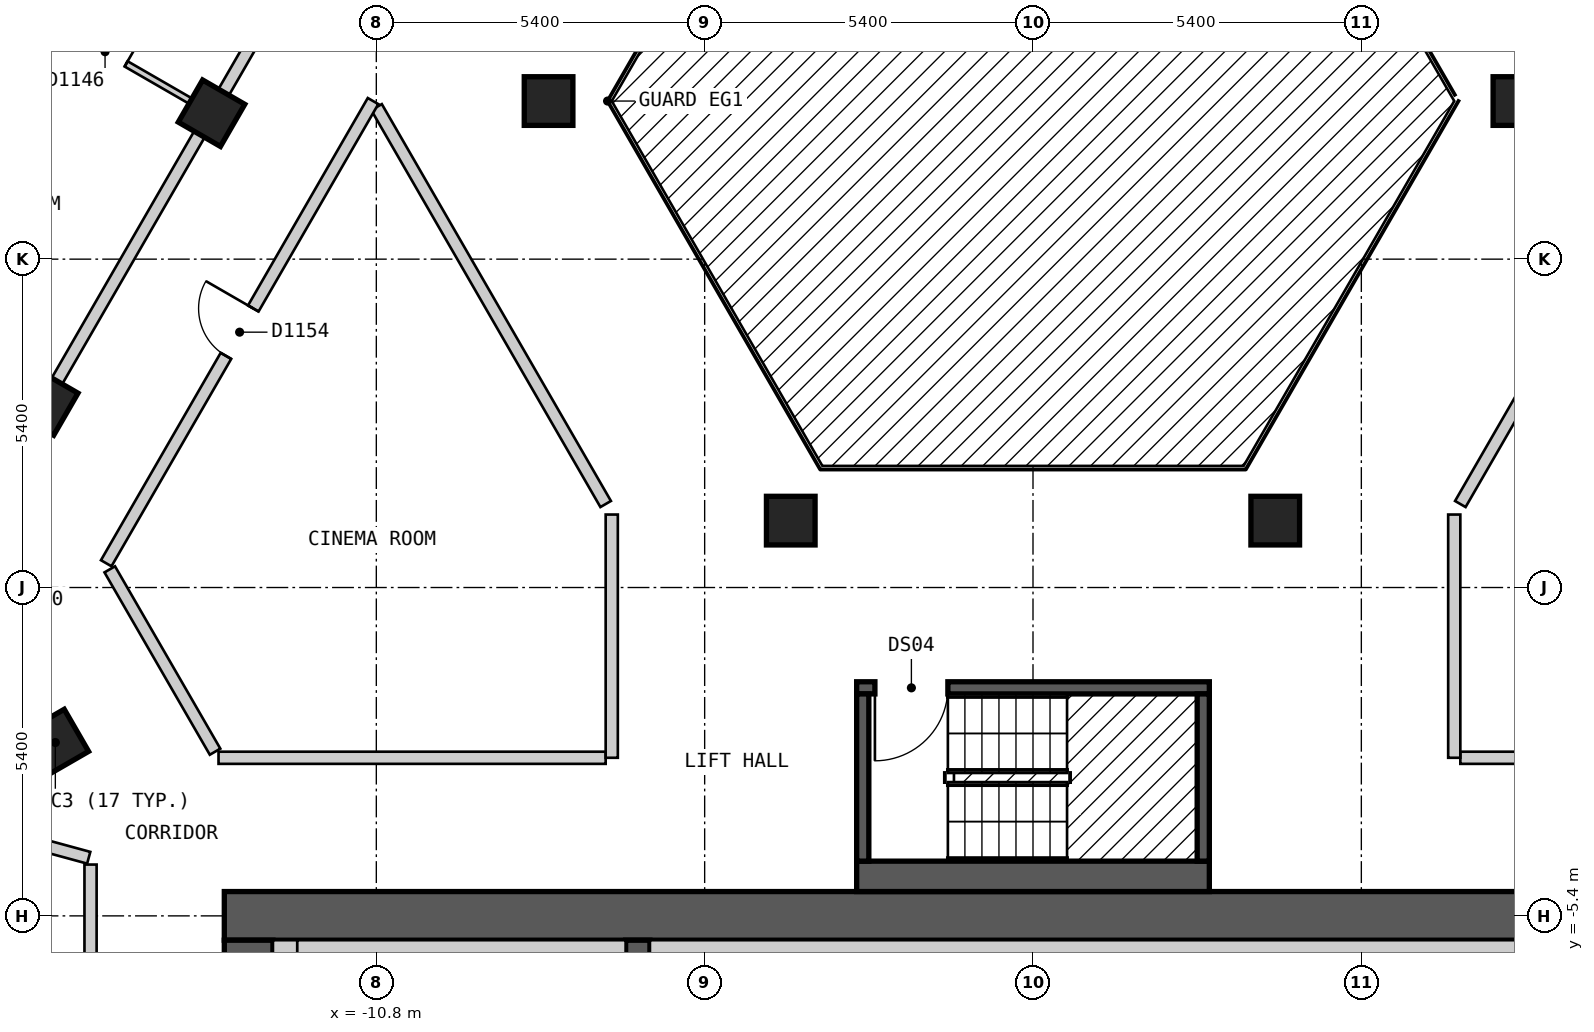
"""IFC4 building model, lengths in metres.
Left out: names, types, materials, properties, quantities, classifications, styles, units other than length and angle.
Written with IfcOpenShell. Run it as: python <this file> out.ifc"""

import sys

from ifc_helpers import new_model, si_unit, direction, frame, frame_2d, origin, origin_2d, place, context, subcontext, project, spatial, polyline, rectangle, outline, extrude, element, fill, save


model = new_model("IFC4")
c1 = context("Model", 3, precision=1e-05, world=origin(), true_north=direction((0.0, 1.0)))
c2 = subcontext(c1, "Body", "Model", "MODEL_VIEW")
j1 = project(units=[si_unit("LENGTHUNIT", "METRE"), si_unit("PLANEANGLEUNIT", "RADIAN")], contexts=[c1])
p1 = place(None, origin())
s1 = spatial("IfcSite", under=j1, at=p1, CompositionType="ELEMENT")
p2 = place(p1, origin())
s2 = spatial("IfcBuilding", under=s1, at=p2, CompositionType="ELEMENT")
p3 = place(p2, frame((0.0, 0.0, 144.6)))
s3 = spatial("IfcBuildingStorey", under=s2, at=p3, CompositionType="ELEMENT", Elevation=144.6)
for number, where, z_axis, x_axis in (
    (1, (-16.079, -2.549, 0.0), (0.0, 0.0, 1.0), (0.5, -0.866, 0.0)),
    (2, (3.984, 1.1, 0.0), (0.0, 0.0, 1.0), (1.0, 0.0, 0.0)),
    (3, (7.967, 8.0, 0.0), (0.0, 0.0, 1.0), (1.0, 0.0, 0.0)),
    (4, (-7.967, 8.0, 0.0), (0.0, 0.0, 1.0), (1.0, 0.0, 0.0)),
    (5, (-13.51, 7.8, 0.0), (0.0, 0.0, 1.0), (-0.5, -0.866, 0.0)),
    (6, (-3.984, 1.1, 0.0), (0.0, 0.0, 1.0), (1.0, 0.0, 0.0)),
    (7, (-16.253, 3.05, 0.0), (0.0, 0.0, 1.0), (-0.5, -0.866, 0.0)),
):
    element("IfcColumn", number, at=place(p3, frame(where, z_axis=z_axis, x_axis=x_axis)), inside=s3, PredefinedType="COLUMN", context=c2, shape_type="SweptSolid", body=[
        extrude(rectangle(XDim=0.8, YDim=0.8, at=origin_2d()), origin(), (0.0, 0.0, 1.0), 3.0),
    ])
p4 = place(p3, frame((-13.3, -5.4, 0.0), z_axis=(0.0, 0.0, 1.0), x_axis=(1.0, 0.0, 0.0)))
e8 = element("IfcWall", 8, at=p4, inside=s3, PredefinedType="SHEAR", context=c2, shape_type="SweptSolid", body=[
    extrude(rectangle(XDim=26.6, YDim=0.8, at=frame_2d((13.3, 0.0))), origin(), (0.0, 0.0, 1.0), 2.7),
])
p5 = place(p4, frame((23.65, 0.0, 0.0)))
e9 = element("IfcOpeningElement", 9, at=p5, cuts=e8, PredefinedType="OPENING", context=c2, shape_type="SweptSolid", body=[
    extrude(rectangle(XDim=1.2, YDim=2.1, at=frame_2d((0.6, 1.05))), frame((0.0, 0.41, 0.0), z_axis=(0.0, -1.0, 0.0), x_axis=(1.0, 0.0, 0.0)), (0.0, 0.0, 1.0), 0.82),
])
p6 = place(p3, frame((-12.9, -18.2, 0.0), z_axis=(0.0, 0.0, 1.0), x_axis=(0.0, 1.0, 0.0)))
e10 = element("IfcWall", 10, at=p6, inside=s3, PredefinedType="SHEAR", context=c2, shape_type="SweptSolid", body=[
    extrude(rectangle(XDim=12.4, YDim=0.8, at=frame_2d((6.2, 0.0))), origin(), (0.0, 0.0, 1.0), 2.7),
])
p7 = place(p6, frame((4.0, 0.0, 0.0)))
e11 = element("IfcOpeningElement", 11, at=p7, cuts=e10, PredefinedType="OPENING", context=c2, shape_type="SweptSolid", body=[
    extrude(rectangle(XDim=1.2, YDim=2.1, at=frame_2d((0.6, 1.05))), frame((0.0, 0.41, 0.0), z_axis=(0.0, -1.0, 0.0), x_axis=(1.0, 0.0, 0.0)), (0.0, 0.0, 1.0), 0.82),
])
p8 = place(p3, frame((-6.5, -9.15, 0.0), z_axis=(0.0, 0.0, 1.0), x_axis=(0.0, 1.0, 0.0)))
e12 = element("IfcWall", 12, at=p8, inside=s3, PredefinedType="SHEAR", context=c2, shape_type="SweptSolid", body=[
    extrude(rectangle(XDim=3.35, YDim=0.4, at=frame_2d((1.675, 0.0))), origin(), (0.0, 0.0, 1.0), 2.7),
])
p9 = place(p3, frame((-28.218, -2.025, 0.0), z_axis=(0.0, 0.0, 1.0), x_axis=(0.500017503135, -0.866015298109, 0.0)))
e13 = element("IfcWall", 13, at=p9, inside=s3, PredefinedType="SOLIDWALL", context=c2, shape_type="SweptSolid", body=[
    extrude(outline(polyline([(0.0, -0.15), (24.711, -0.15), (24.631, 0.15), (0.08, 0.15), (0.0, -0.15)])), origin(), (0.0, 0.0, 1.0), 2.7),
])
p10 = place(p9, frame((1.4, 0.0, 0.15)))
e14 = element("IfcOpeningElement", 14, at=p10, cuts=e13, PredefinedType="OPENING", context=c2, shape_type="SweptSolid", body=[
    extrude(rectangle(XDim=1.5, YDim=2.1, at=frame_2d((0.75, 1.05))), frame((0.0, 0.16, 0.0), z_axis=(0.0, -1.0, 0.0), x_axis=(1.0, 0.0, 0.0)), (0.0, 0.0, 1.0), 0.32),
])
p11 = place(p9, frame((4.316, 0.0, 0.15)))
e15 = element("IfcOpeningElement", 15, at=p11, cuts=e13, PredefinedType="OPENING", context=c2, shape_type="SweptSolid", body=[
    extrude(rectangle(XDim=1.5, YDim=2.1, at=frame_2d((0.75, 1.05))), frame((0.0, 0.16, 0.0), z_axis=(0.0, -1.0, 0.0), x_axis=(1.0, 0.0, 0.0)), (0.0, 0.0, 1.0), 0.32),
])
p12 = place(p9, frame((7.231, 0.0, 0.15)))
e16 = element("IfcOpeningElement", 16, at=p12, cuts=e13, PredefinedType="OPENING", context=c2, shape_type="SweptSolid", body=[
    extrude(rectangle(XDim=1.5, YDim=2.1, at=frame_2d((0.75, 1.05))), frame((0.0, 0.16, 0.0), z_axis=(0.0, -1.0, 0.0), x_axis=(1.0, 0.0, 0.0)), (0.0, 0.0, 1.0), 0.32),
])
p13 = place(p9, frame((10.147, 0.0, 0.15)))
e17 = element("IfcOpeningElement", 17, at=p13, cuts=e13, PredefinedType="OPENING", context=c2, shape_type="SweptSolid", body=[
    extrude(rectangle(XDim=1.5, YDim=2.1, at=frame_2d((0.75, 1.05))), frame((0.0, 0.16, 0.0), z_axis=(0.0, -1.0, 0.0), x_axis=(1.0, 0.0, 0.0)), (0.0, 0.0, 1.0), 0.32),
])
p14 = place(p9, frame((13.062, 0.0, 0.15)))
e18 = element("IfcOpeningElement", 18, at=p14, cuts=e13, PredefinedType="OPENING", context=c2, shape_type="SweptSolid", body=[
    extrude(rectangle(XDim=1.5, YDim=2.1, at=frame_2d((0.75, 1.05))), frame((0.0, 0.16, 0.0), z_axis=(0.0, -1.0, 0.0), x_axis=(1.0, 0.0, 0.0)), (0.0, 0.0, 1.0), 0.32),
])
p15 = place(p9, frame((15.977, 0.0, 0.15)))
e19 = element("IfcOpeningElement", 19, at=p15, cuts=e13, PredefinedType="OPENING", context=c2, shape_type="SweptSolid", body=[
    extrude(rectangle(XDim=1.5, YDim=2.1, at=frame_2d((0.75, 1.05))), frame((0.0, 0.16, 0.0), z_axis=(0.0, -1.0, 0.0), x_axis=(1.0, 0.0, 0.0)), (0.0, 0.0, 1.0), 0.32),
])
p16 = place(p9, frame((18.893, 0.0, 0.15)))
e20 = element("IfcOpeningElement", 20, at=p16, cuts=e13, PredefinedType="OPENING", context=c2, shape_type="SweptSolid", body=[
    extrude(rectangle(XDim=1.5, YDim=2.1, at=frame_2d((0.75, 1.05))), frame((0.0, 0.16, 0.0), z_axis=(0.0, -1.0, 0.0), x_axis=(1.0, 0.0, 0.0)), (0.0, 0.0, 1.0), 0.32),
])
p17 = place(p9, frame((21.809, 0.0, 0.15)))
e21 = element("IfcOpeningElement", 21, at=p17, cuts=e13, PredefinedType="OPENING", context=c2, shape_type="SweptSolid", body=[
    extrude(rectangle(XDim=1.5, YDim=2.1, at=frame_2d((0.75, 1.05))), frame((0.0, 0.16, 0.0), z_axis=(0.0, -1.0, 0.0), x_axis=(1.0, 0.0, 0.0)), (0.0, 0.0, 1.0), 0.32),
])
p18 = place(p3, frame((-2.9, -4.75, 0.0), z_axis=(0.0, 0.0, 1.0), x_axis=(1.0, 0.0, 0.0)))
e22 = element("IfcWall", 22, at=p18, inside=s3, PredefinedType="SOLIDWALL", context=c2, shape_type="SweptSolid", body=[
    extrude(rectangle(XDim=5.8, YDim=0.5, at=frame_2d((2.9, 0.0))), origin(), (0.0, 0.0, 1.0), 2.7),
])
p19 = place(p3, frame((-2.9, -1.65, 0.0), z_axis=(0.0, 0.0, 1.0), x_axis=(1.0, 0.0, 0.0)))
e23 = element("IfcWall", 23, at=p19, inside=s3, PredefinedType="SOLIDWALL", context=c2, shape_type="SweptSolid", body=[
    extrude(rectangle(XDim=5.8, YDim=0.2, at=frame_2d((2.9, 0.0))), origin(), (0.0, 0.0, 1.0), 2.7),
])
p20 = place(p19, frame((0.3, 0.0, 0.0)))
e24 = element("IfcOpeningElement", 24, at=p20, cuts=e23, PredefinedType="OPENING", context=c2, shape_type="SweptSolid", body=[
    extrude(rectangle(XDim=1.2, YDim=2.1, at=frame_2d((0.6, 1.05))), frame((0.0, 0.11, 0.0), z_axis=(0.0, -1.0, 0.0), x_axis=(1.0, 0.0, 0.0)), (0.0, 0.0, 1.0), 0.22),
])
for number, where, z_axis, x_axis in (
    (25, (-2.8, -4.5, 0.0), (0.0, 0.0, 1.0), (0.0, 1.0, 0.0)),
    (26, (2.8, -4.5, 0.0), (0.0, 0.0, 1.0), (0.0, 1.0, 0.0)),
):
    element("IfcWall", number, at=place(p3, frame(where, z_axis=z_axis, x_axis=x_axis)), inside=s3, PredefinedType="SOLIDWALL", context=c2, shape_type="SweptSolid", body=[
        extrude(rectangle(XDim=2.75, YDim=0.2, at=frame_2d((1.375, 0.0))), origin(), (0.0, 0.0, 1.0), 2.7),
    ])
p21 = place(p3, frame((-10.796, 7.9, 0.0), z_axis=(0.0, 0.0, 1.0), x_axis=(0.499954271211, -0.866051803703, 0.0)))
e27 = element("IfcWall", 27, at=p21, inside=s3, PredefinedType="PARTITIONING", context=c2, shape_type="SweptSolid", body=[
    extrude(rectangle(XDim=7.536, YDim=0.2, at=frame_2d((3.768, 0.0))), origin(), (0.0, 0.0, 1.0), 2.7),
])
p22 = place(p3, frame((-15.184, 0.299, 0.0), z_axis=(0.0, 0.0, 1.0), x_axis=(0.500149577091, -0.865939028186, 0.0)))
e28 = element("IfcWall", 28, at=p22, inside=s3, PredefinedType="PARTITIONING", context=c2, shape_type="SweptSolid", body=[
    extrude(rectangle(XDim=3.463, YDim=0.2, at=frame_2d((1.732, 0.0))), origin(), (0.0, 0.0, 1.0), 2.7),
])
p23 = place(p3, frame((-17.724, 0.299, 0.0), z_axis=(0.0, 0.0, 1.0), x_axis=(0.499910220442, -0.866077231832, 0.0)))
e29 = element("IfcWall", 29, at=p23, inside=s3, PredefinedType="PARTITIONING", context=c2, shape_type="SweptSolid", body=[
    extrude(rectangle(XDim=3.189, YDim=0.2, at=frame_2d((1.594, 0.0))), origin(), (0.0, 0.0, 1.0), 2.7),
])
p24 = place(p23, frame((0.183, 0.0, 0.0)))
e30 = element("IfcOpeningElement", 30, at=p24, cuts=e29, PredefinedType="OPENING", context=c2, shape_type="SweptSolid", body=[
    extrude(rectangle(XDim=0.8, YDim=2.1, at=frame_2d((0.4, 1.05))), frame((0.0, 0.11, 0.0), z_axis=(0.0, -1.0, 0.0), x_axis=(1.0, 0.0, 0.0)), (0.0, 0.0, 1.0), 0.22),
])
p25 = place(p3, frame((7.967, 13.0, 0.0), z_axis=(0.0, 0.0, 1.0), x_axis=(0.50003774998, -0.866003607726, 0.0)))
e31 = element("IfcWall", 31, at=p25, inside=s3, PredefinedType="PARTITIONING", context=c2, shape_type="SweptSolid", body=[
    extrude(rectangle(XDim=14.433, YDim=0.2, at=frame_2d((7.217, 0.0))), origin(), (0.0, 0.0, 1.0), 2.7),
])
p26 = place(p25, frame((6.824, 0.0, 0.0)))
e32 = element("IfcOpeningElement", 32, at=p26, cuts=e31, PredefinedType="OPENING", context=c2, shape_type="SweptSolid", body=[
    extrude(rectangle(XDim=0.9, YDim=2.1, at=frame_2d((0.45, 1.05))), frame((0.0, 0.11, 0.0), z_axis=(0.0, -1.0, 0.0), x_axis=(1.0, 0.0, 0.0)), (0.0, 0.0, 1.0), 0.22),
])
p27 = place(p3, frame((-13.395, -2.8, 0.0), z_axis=(0.0, 0.0, 1.0), x_axis=(1.0, 0.0, 0.0)))
e33 = element("IfcWall", 33, at=p27, inside=s3, PredefinedType="PARTITIONING", context=c2, shape_type="SweptSolid", body=[
    extrude(rectangle(XDim=6.367, YDim=0.2, at=frame_2d((3.184, 0.0))), origin(), (0.0, 0.0, 1.0), 2.7),
])
p28 = place(p3, frame((7.028, -2.8, 0.0), z_axis=(0.0, 0.0, 1.0), x_axis=(1.0, 0.0, 0.0)))
e34 = element("IfcWall", 34, at=p28, inside=s3, PredefinedType="PARTITIONING", context=c2, shape_type="SweptSolid", body=[
    extrude(rectangle(XDim=6.25, YDim=0.2, at=frame_2d((3.125, 0.0))), origin(), (0.0, 0.0, 1.0), 2.7),
])
p29 = place(p3, frame((7.028, 1.373, 0.0), z_axis=(0.0, 0.0, 1.0), x_axis=(0.499954271211, 0.866051803703, 0.0)))
e35 = element("IfcWall", 35, at=p29, inside=s3, PredefinedType="PARTITIONING", context=c2, shape_type="SweptSolid", body=[
    extrude(rectangle(XDim=7.536, YDim=0.2, at=frame_2d((3.768, 0.0))), origin(), (0.0, 0.0, 1.0), 2.7),
])
p30 = place(p3, frame((-15.242, 0.399, 0.0), z_axis=(0.0, 0.0, 1.0), x_axis=(0.499953615651, 0.866052182145, 0.0)))
e36 = element("IfcWall", 36, at=p30, inside=s3, PredefinedType="PARTITIONING", context=c2, shape_type="SweptSolid", body=[
    extrude(rectangle(XDim=8.777, YDim=0.2, at=frame_2d((4.388, 0.0))), origin(), (0.0, 0.0, 1.0), 2.7),
])
p31 = place(p30, frame((3.938, 0.0, 0.0)))
e37 = element("IfcOpeningElement", 37, at=p31, cuts=e36, PredefinedType="OPENING", context=c2, shape_type="SweptSolid", body=[
    extrude(rectangle(XDim=0.9, YDim=2.1, at=frame_2d((0.45, 1.05))), frame((0.0, 0.11, 0.0), z_axis=(0.0, -1.0, 0.0), x_axis=(1.0, 0.0, 0.0)), (0.0, 0.0, 1.0), 0.22),
])
p32 = place(p3, frame((-17.724, 0.5, 0.0), z_axis=(0.0, 0.0, 1.0), x_axis=(0.499992388462, 0.866029798263, 0.0)))
e38 = element("IfcWall", 38, at=p32, inside=s3, PredefinedType="PARTITIONING", context=c2, shape_type="SweptSolid", body=[
    extrude(rectangle(XDim=16.859, YDim=0.2, at=frame_2d((8.429, 0.0))), origin(), (0.0, 0.0, 1.0), 2.7),
])
p33 = place(p32, frame((10.672, 0.0, 0.0)))
e39 = element("IfcOpeningElement", 39, at=p33, cuts=e38, PredefinedType="OPENING", context=c2, shape_type="SweptSolid", body=[
    extrude(rectangle(XDim=1.0, YDim=2.1, at=frame_2d((0.5, 1.05))), frame((0.0, 0.11, 0.0), z_axis=(0.0, -1.0, 0.0), x_axis=(1.0, 0.0, 0.0)), (0.0, 0.0, 1.0), 0.22),
])
for number, where, z_axis, x_axis in (
    (40, (6.928, -2.8, 0.0), (0.0, 0.0, 1.0), (0.0, 1.0, 0.0)),
    (41, (-6.928, -2.8, 0.0), (0.0, 0.0, 1.0), (0.0, 1.0, 0.0)),
):
    element("IfcWall", number, at=place(p3, frame(where, z_axis=z_axis, x_axis=x_axis)), inside=s3, PredefinedType="PARTITIONING", context=c2, shape_type="SweptSolid", body=[
        extrude(rectangle(XDim=4.0, YDim=0.2, at=frame_2d((2.0, 0.0))), origin(), (0.0, 0.0, 1.0), 2.7),
    ])
p34 = place(p3, frame((-15.5, -6.6, 0.0), z_axis=(0.0, 0.0, 1.0), x_axis=(0.0, 1.0, 0.0)))
e42 = element("IfcWall", 42, at=p34, inside=s3, PredefinedType="PARTITIONING", context=c2, shape_type="SweptSolid", body=[
    extrude(rectangle(XDim=2.044, YDim=0.2, at=frame_2d((1.022, 0.0))), origin(), (0.0, 0.0, 1.0), 2.7),
])
p35 = place(p3, frame((-16.971, 9.798, 0.0), z_axis=(0.0, 0.0, 1.0), x_axis=(0.866087525071, -0.499892387336, 0.0)))
e43 = element("IfcWall", 43, at=p35, inside=s3, PredefinedType="PARTITIONING", context=c2, shape_type="SweptSolid", body=[
    extrude(rectangle(XDim=3.897, YDim=0.1, at=frame_2d((1.948, 0.0))), origin(), (0.0, 0.0, 1.0), 2.7),
])
p36 = place(p35, frame((1.574, 0.0, 0.0)))
e44 = element("IfcOpeningElement", 44, at=p36, cuts=e43, PredefinedType="OPENING", context=c2, shape_type="SweptSolid", body=[
    extrude(rectangle(XDim=0.8, YDim=2.1, at=frame_2d((0.4, 1.05))), frame((0.0, 0.06, 0.0), z_axis=(0.0, -1.0, 0.0), x_axis=(1.0, 0.0, 0.0)), (0.0, 0.0, 1.0), 0.12),
])
p37 = place(p3, frame((-22.398, 0.499, 0.0), z_axis=(0.0, 0.0, 1.0), x_axis=(0.499981561717, 0.866036048871, 0.0)))
e45 = element("IfcWall", 45, at=p37, inside=s3, PredefinedType="PARTITIONING", context=c2, shape_type="SweptSolid", body=[
    extrude(rectangle(XDim=21.532, YDim=0.1, at=frame_2d((10.766, 0.0))), origin(), (0.0, 0.0, 1.0), 2.7),
])
p38 = place(p37, frame((13.049, 0.0, 0.0)))
e46 = element("IfcOpeningElement", 46, at=p38, cuts=e45, PredefinedType="OPENING", context=c2, shape_type="SweptSolid", body=[
    extrude(rectangle(XDim=0.9, YDim=2.1, at=frame_2d((0.45, 1.05))), frame((0.0, 0.06, 0.0), z_axis=(0.0, -1.0, 0.0), x_axis=(1.0, 0.0, 0.0)), (0.0, 0.0, 1.0), 0.12),
])
p39 = place(p37, frame((2.183, 0.0, 0.0)))
e47 = element("IfcOpeningElement", 47, at=p39, cuts=e45, PredefinedType="OPENING", context=c2, shape_type="SweptSolid", body=[
    extrude(rectangle(XDim=0.8, YDim=2.1, at=frame_2d((0.4, 1.05))), frame((0.0, 0.06, 0.0), z_axis=(0.0, -1.0, 0.0), x_axis=(1.0, 0.0, 0.0)), (0.0, 0.0, 1.0), 0.12),
])
p40 = place(p3, frame((-17.956, -3.783, 0.0), z_axis=(0.0, 0.0, 1.0), x_axis=(0.964815336827, -0.2629284424, 0.0)))
e48 = element("IfcWall", 48, at=p40, inside=s3, PredefinedType="PARTITIONING", context=c2, shape_type="SweptSolid", body=[
    extrude(rectangle(XDim=2.514, YDim=0.2, at=frame_2d((1.257, 0.0))), origin(), (0.0, 0.0, 1.0), 2.7),
])
p41 = place(p3, frame((-18.096, -3.714, 0.0), z_axis=(0.0, 0.0, 1.0), x_axis=(0.865794513859, 0.500399700011, 0.0)))
e49 = element("IfcWall", 49, at=p41, inside=s3, PredefinedType="PARTITIONING", context=c2, shape_type="SweptSolid", body=[
    extrude(rectangle(XDim=2.298, YDim=0.2, at=frame_2d((1.149, 0.0))), origin(), (0.0, 0.0, 1.0), 2.7),
])
p42 = place(p3, frame((-12.3, -9.15, 0.0), z_axis=(0.0, 0.0, 1.0), x_axis=(0.0, 1.0, 0.0)))
e50 = element("IfcWall", 50, at=p42, inside=s3, PredefinedType="SOLIDWALL", context=c2, shape_type="SweptSolid", body=[
    extrude(rectangle(XDim=3.35, YDim=0.4, at=frame_2d((1.675, 0.0))), origin(), (0.0, 0.0, 1.0), 2.7),
])
p43 = place(p3, frame((-12.1, -6.0, 0.0), z_axis=(0.0, 0.0, 1.0), x_axis=(1.0, 0.0, 0.0)))
e51 = element("IfcWall", 51, at=p43, inside=s3, PredefinedType="SOLIDWALL", context=c2, shape_type="SweptSolid", body=[
    extrude(rectangle(XDim=5.4, YDim=0.4, at=frame_2d((2.7, 0.0))), origin(), (0.0, 0.0, 1.0), 2.7),
])
p44 = place(p3, frame((-6.3, -6.0, 0.0), z_axis=(0.0, 0.0, 1.0), x_axis=(1.0, 0.0, 0.0)))
e52 = element("IfcWall", 52, at=p44, inside=s3, PredefinedType="SOLIDWALL", context=c2, shape_type="SweptSolid", body=[
    extrude(rectangle(XDim=16.1, YDim=0.4, at=frame_2d((8.05, 0.0))), origin(), (0.0, 0.0, 1.0), 2.7),
])
p45 = place(p20, origin())
e53 = element("IfcDoor", 53, at=p45, inside=s3, OperationType="SINGLE_SWING_LEFT", PredefinedType="DOOR", context=c2, shape_type="SweptSolid", body=[
    extrude(rectangle(XDim=1.2, YDim=2.1, at=frame_2d((0.6, 1.05))), frame((0.0, 0.025, 0.0), z_axis=(0.0, -1.0, 0.0), x_axis=(1.0, 0.0, 0.0)), (0.0, 0.0, 1.0), 0.05),
])
fill(e24, e53)
p46 = place(p36, origin())
e54 = element("IfcDoor", 54, at=p46, inside=s3, OperationType="SINGLE_SWING_RIGHT", PredefinedType="DOOR", context=c2, shape_type="SweptSolid", body=[
    extrude(rectangle(XDim=0.8, YDim=2.1, at=frame_2d((0.4, 1.05))), frame((0.0, 0.025, 0.0), z_axis=(0.0, -1.0, 0.0), x_axis=(1.0, 0.0, 0.0)), (0.0, 0.0, 1.0), 0.05),
])
fill(e44, e54)
p47 = place(p31, origin())
e55 = element("IfcDoor", 55, at=p47, inside=s3, OperationType="SINGLE_SWING_RIGHT", PredefinedType="DOOR", context=c2, shape_type="SweptSolid", body=[
    extrude(rectangle(XDim=0.9, YDim=2.1, at=frame_2d((0.45, 1.05))), frame((0.0, 0.025, 0.0), z_axis=(0.0, -1.0, 0.0), x_axis=(1.0, 0.0, 0.0)), (0.0, 0.0, 1.0), 0.05),
])
fill(e37, e55)
save(model, sys.argv[1])
